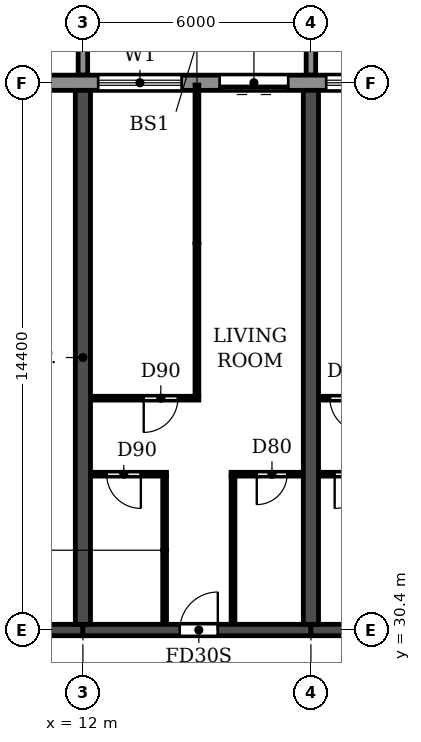
"""IFC4 building model, lengths in metres.
Left out: names, types, materials, properties, quantities, classifications, styles, units other than length and angle.
Written with IfcOpenShell. Run it as: python <this file> out.ifc"""

import sys

from ifc_helpers import new_model, si_unit, direction, frame, frame_2d, origin, place, context, subcontext, project, spatial, polyline, rectangle, outline, extrude, source, transform, mapped, element, fill, save


model = new_model("IFC4")
c1 = context("Model", 3, precision=1e-05, world=origin(), true_north=direction((0.0, 1.0)))
c2 = subcontext(c1, "Body", "Model", "MODEL_VIEW")
j1 = project(units=[si_unit("LENGTHUNIT", "METRE"), si_unit("PLANEANGLEUNIT", "RADIAN")], contexts=[c1])
p1 = place(None, origin())
s1 = spatial("IfcSite", under=j1, at=p1, CompositionType="ELEMENT")
p2 = place(p1, origin())
s2 = spatial("IfcBuilding", under=s1, at=p2, CompositionType="ELEMENT")
p3 = place(p2, frame((0.0, 0.0, 63.0)))
s3 = spatial("IfcBuildingStorey", under=s2, at=p3, CompositionType="ELEMENT", Elevation=63.0)
for number, where, z_axis, x_axis in (
    (1, (12.0, 30.55, 0.0), (0.0, 0.0, 1.0), (0.0, 1.0, 0.0)),
    (2, (18.0, 30.55, 0.0), (0.0, 0.0, 1.0), (0.0, 1.0, 0.0)),
):
    element("IfcWall", number, at=place(p3, frame(where, z_axis=z_axis, x_axis=x_axis)), inside=s3, PredefinedType="SHEAR", context=c2, shape_type="SweptSolid", body=[
        extrude(rectangle(XDim=14.05, YDim=0.4, at=frame_2d((7.025, 0.0))), origin(), (0.0, 0.0, 1.0), 2.95),
    ])
p4 = place(p3, frame((6.2, 30.4, 0.0), z_axis=(0.0, 0.0, 1.0), x_axis=(1.0, 0.0, 0.0)))
e3 = element("IfcWall", 3, at=p4, inside=s3, PredefinedType="SHEAR", context=c2, shape_type="SweptSolid", body=[
    extrude(rectangle(XDim=5.8, YDim=0.3, at=frame_2d((2.9, 0.0))), origin(), (0.0, 0.0, 1.0), 2.35),
])
p5 = place(p4, frame((2.3, 0.0, 0.0)))
e4 = element("IfcOpeningElement", 4, at=p5, cuts=e3, PredefinedType="OPENING", context=c2, shape_type="SweptSolid", body=[
    extrude(rectangle(XDim=1.0, YDim=2.1, at=frame_2d((0.5, 1.05))), frame((0.0, 0.16, 0.0), z_axis=(0.0, -1.0, 0.0), x_axis=(1.0, 0.0, 0.0)), (0.0, 0.0, 1.0), 0.32),
])
p6 = place(p3, frame((12.0, 30.4, 0.0), z_axis=(0.0, 0.0, 1.0), x_axis=(1.0, 0.0, 0.0)))
e5 = element("IfcWall", 5, at=p6, inside=s3, PredefinedType="SHEAR", context=c2, shape_type="SweptSolid", body=[
    extrude(rectangle(XDim=6.0, YDim=0.3, at=frame_2d((3.0, 0.0))), origin(), (0.0, 0.0, 1.0), 2.35),
])
p7 = place(p6, frame((2.55, 0.0, 0.0)))
e6 = element("IfcOpeningElement", 6, at=p7, cuts=e5, PredefinedType="OPENING", context=c2, shape_type="SweptSolid", body=[
    extrude(rectangle(XDim=1.0, YDim=2.1, at=frame_2d((0.5, 1.05))), frame((0.0, 0.16, 0.0), z_axis=(0.0, -1.0, 0.0), x_axis=(1.0, 0.0, 0.0)), (0.0, 0.0, 1.0), 0.32),
])
p8 = place(p3, frame((18.0, 30.4, 0.0), z_axis=(0.0, 0.0, 1.0), x_axis=(1.0, 0.0, 0.0)))
e7 = element("IfcWall", 7, at=p8, inside=s3, PredefinedType="SHEAR", context=c2, shape_type="SweptSolid", body=[
    extrude(rectangle(XDim=6.0, YDim=0.3, at=frame_2d((3.0, 0.0))), origin(), (0.0, 0.0, 1.0), 2.35),
])
p9 = place(p8, frame((2.55, 0.0, 0.0)))
e8 = element("IfcOpeningElement", 8, at=p9, cuts=e7, PredefinedType="OPENING", context=c2, shape_type="SweptSolid", body=[
    extrude(rectangle(XDim=1.0, YDim=2.1, at=frame_2d((0.5, 1.05))), frame((0.0, 0.16, 0.0), z_axis=(0.0, -1.0, 0.0), x_axis=(1.0, 0.0, 0.0)), (0.0, 0.0, 1.0), 0.32),
])
p10 = place(p3, frame((91.317, 44.8, 0.0), z_axis=(0.0, 0.0, 1.0), x_axis=(-1.0, 0.0, 0.0)))
e9 = element("IfcWall", 9, at=p10, inside=s3, PredefinedType="STANDARD", context=c2, shape_type="SweptSolid", body=[
    extrude(rectangle(XDim=80.634, YDim=0.4, at=frame_2d((40.317, 0.0))), origin(), (0.0, 0.0, 1.0), 2.95),
])
p11 = place(p10, frame((76.717, 0.0, 0.9)))
e10 = element("IfcOpeningElement", 10, at=p11, cuts=e9, PredefinedType="OPENING", context=c2, shape_type="SweptSolid", body=[
    extrude(rectangle(XDim=2.2, YDim=1.5, at=frame_2d((1.1, 0.75))), frame((0.0, 0.21, 0.0), z_axis=(0.0, -1.0, 0.0), x_axis=(1.0, 0.0, 0.0)), (0.0, 0.0, 1.0), 0.42),
])
p12 = place(p10, frame((73.917, 0.0, 0.0)))
e11 = element("IfcOpeningElement", 11, at=p12, cuts=e9, PredefinedType="OPENING", context=c2, shape_type="SweptSolid", body=[
    extrude(rectangle(XDim=1.8, YDim=2.4, at=frame_2d((0.9, 1.2))), frame((0.0, 0.21, 0.0), z_axis=(0.0, -1.0, 0.0), x_axis=(1.0, 0.0, 0.0)), (0.0, 0.0, 1.0), 0.42),
])
p13 = place(p10, frame((70.717, 0.0, 0.9)))
e12 = element("IfcOpeningElement", 12, at=p13, cuts=e9, PredefinedType="OPENING", context=c2, shape_type="SweptSolid", body=[
    extrude(rectangle(XDim=2.2, YDim=1.5, at=frame_2d((1.1, 0.75))), frame((0.0, 0.21, 0.0), z_axis=(0.0, -1.0, 0.0), x_axis=(1.0, 0.0, 0.0)), (0.0, 0.0, 1.0), 0.42),
])
p14 = place(p10, frame((67.917, 0.0, 0.0)))
e13 = element("IfcOpeningElement", 13, at=p14, cuts=e9, PredefinedType="OPENING", context=c2, shape_type="SweptSolid", body=[
    extrude(rectangle(XDim=1.8, YDim=2.4, at=frame_2d((0.9, 1.2))), frame((0.0, 0.21, 0.0), z_axis=(0.0, -1.0, 0.0), x_axis=(1.0, 0.0, 0.0)), (0.0, 0.0, 1.0), 0.42),
])
p15 = place(p10, frame((64.717, 0.0, 0.9)))
e14 = element("IfcOpeningElement", 14, at=p15, cuts=e9, PredefinedType="OPENING", context=c2, shape_type="SweptSolid", body=[
    extrude(rectangle(XDim=2.2, YDim=1.5, at=frame_2d((1.1, 0.75))), frame((0.0, 0.21, 0.0), z_axis=(0.0, -1.0, 0.0), x_axis=(1.0, 0.0, 0.0)), (0.0, 0.0, 1.0), 0.42),
])
p16 = place(p10, frame((61.917, 0.0, 0.0)))
e15 = element("IfcOpeningElement", 15, at=p16, cuts=e9, PredefinedType="OPENING", context=c2, shape_type="SweptSolid", body=[
    extrude(rectangle(XDim=1.8, YDim=2.4, at=frame_2d((0.9, 1.2))), frame((0.0, 0.21, 0.0), z_axis=(0.0, -1.0, 0.0), x_axis=(1.0, 0.0, 0.0)), (0.0, 0.0, 1.0), 0.42),
])
p17 = place(p10, frame((58.717, 0.0, 0.9)))
e16 = element("IfcOpeningElement", 16, at=p17, cuts=e9, PredefinedType="OPENING", context=c2, shape_type="SweptSolid", body=[
    extrude(rectangle(XDim=2.2, YDim=1.5, at=frame_2d((1.1, 0.75))), frame((0.0, 0.21, 0.0), z_axis=(0.0, -1.0, 0.0), x_axis=(1.0, 0.0, 0.0)), (0.0, 0.0, 1.0), 0.42),
])
p18 = place(p10, frame((55.717, 0.0, 0.9)))
e17 = element("IfcOpeningElement", 17, at=p18, cuts=e9, PredefinedType="OPENING", context=c2, shape_type="SweptSolid", body=[
    extrude(rectangle(XDim=2.2, YDim=1.5, at=frame_2d((1.1, 0.75))), frame((0.0, 0.21, 0.0), z_axis=(0.0, -1.0, 0.0), x_axis=(1.0, 0.0, 0.0)), (0.0, 0.0, 1.0), 0.42),
])
p19 = place(p10, frame((52.917, 0.0, 0.0)))
e18 = element("IfcOpeningElement", 18, at=p19, cuts=e9, PredefinedType="OPENING", context=c2, shape_type="SweptSolid", body=[
    extrude(rectangle(XDim=1.8, YDim=2.4, at=frame_2d((0.9, 1.2))), frame((0.0, 0.21, 0.0), z_axis=(0.0, -1.0, 0.0), x_axis=(1.0, 0.0, 0.0)), (0.0, 0.0, 1.0), 0.42),
])
p20 = place(p10, frame((49.717, 0.0, 0.9)))
e19 = element("IfcOpeningElement", 19, at=p20, cuts=e9, PredefinedType="OPENING", context=c2, shape_type="SweptSolid", body=[
    extrude(rectangle(XDim=2.2, YDim=1.5, at=frame_2d((1.1, 0.75))), frame((0.0, 0.21, 0.0), z_axis=(0.0, -1.0, 0.0), x_axis=(1.0, 0.0, 0.0)), (0.0, 0.0, 1.0), 0.42),
])
p21 = place(p10, frame((46.917, 0.0, 0.0)))
e20 = element("IfcOpeningElement", 20, at=p21, cuts=e9, PredefinedType="OPENING", context=c2, shape_type="SweptSolid", body=[
    extrude(rectangle(XDim=1.8, YDim=2.4, at=frame_2d((0.9, 1.2))), frame((0.0, 0.21, 0.0), z_axis=(0.0, -1.0, 0.0), x_axis=(1.0, 0.0, 0.0)), (0.0, 0.0, 1.0), 0.42),
])
p22 = place(p10, frame((43.717, 0.0, 0.9)))
e21 = element("IfcOpeningElement", 21, at=p22, cuts=e9, PredefinedType="OPENING", context=c2, shape_type="SweptSolid", body=[
    extrude(rectangle(XDim=2.2, YDim=1.5, at=frame_2d((1.1, 0.75))), frame((0.0, 0.21, 0.0), z_axis=(0.0, -1.0, 0.0), x_axis=(1.0, 0.0, 0.0)), (0.0, 0.0, 1.0), 0.42),
])
p23 = place(p10, frame((40.717, 0.0, 0.9)))
e22 = element("IfcOpeningElement", 22, at=p23, cuts=e9, PredefinedType="OPENING", context=c2, shape_type="SweptSolid", body=[
    extrude(rectangle(XDim=2.2, YDim=1.5, at=frame_2d((1.1, 0.75))), frame((0.0, 0.21, 0.0), z_axis=(0.0, -1.0, 0.0), x_axis=(1.0, 0.0, 0.0)), (0.0, 0.0, 1.0), 0.42),
])
p24 = place(p10, frame((37.717, 0.0, 0.9)))
e23 = element("IfcOpeningElement", 23, at=p24, cuts=e9, PredefinedType="OPENING", context=c2, shape_type="SweptSolid", body=[
    extrude(rectangle(XDim=2.2, YDim=1.5, at=frame_2d((1.1, 0.75))), frame((0.0, 0.21, 0.0), z_axis=(0.0, -1.0, 0.0), x_axis=(1.0, 0.0, 0.0)), (0.0, 0.0, 1.0), 0.42),
])
p25 = place(p10, frame((34.717, 0.0, 0.9)))
e24 = element("IfcOpeningElement", 24, at=p25, cuts=e9, PredefinedType="OPENING", context=c2, shape_type="SweptSolid", body=[
    extrude(rectangle(XDim=2.2, YDim=1.5, at=frame_2d((1.1, 0.75))), frame((0.0, 0.21, 0.0), z_axis=(0.0, -1.0, 0.0), x_axis=(1.0, 0.0, 0.0)), (0.0, 0.0, 1.0), 0.42),
])
p26 = place(p10, frame((31.917, 0.0, 0.0)))
e25 = element("IfcOpeningElement", 25, at=p26, cuts=e9, PredefinedType="OPENING", context=c2, shape_type="SweptSolid", body=[
    extrude(rectangle(XDim=1.8, YDim=2.4, at=frame_2d((0.9, 1.2))), frame((0.0, 0.21, 0.0), z_axis=(0.0, -1.0, 0.0), x_axis=(1.0, 0.0, 0.0)), (0.0, 0.0, 1.0), 0.42),
])
p27 = place(p10, frame((28.917, 0.0, 0.0)))
e26 = element("IfcOpeningElement", 26, at=p27, cuts=e9, PredefinedType="OPENING", context=c2, shape_type="SweptSolid", body=[
    extrude(rectangle(XDim=1.8, YDim=2.4, at=frame_2d((0.9, 1.2))), frame((0.0, 0.21, 0.0), z_axis=(0.0, -1.0, 0.0), x_axis=(1.0, 0.0, 0.0)), (0.0, 0.0, 1.0), 0.42),
])
p28 = place(p10, frame((25.717, 0.0, 0.9)))
e27 = element("IfcOpeningElement", 27, at=p28, cuts=e9, PredefinedType="OPENING", context=c2, shape_type="SweptSolid", body=[
    extrude(rectangle(XDim=2.2, YDim=1.5, at=frame_2d((1.1, 0.75))), frame((0.0, 0.21, 0.0), z_axis=(0.0, -1.0, 0.0), x_axis=(1.0, 0.0, 0.0)), (0.0, 0.0, 1.0), 0.42),
])
p29 = place(p10, frame((22.917, 0.0, 0.0)))
e28 = element("IfcOpeningElement", 28, at=p29, cuts=e9, PredefinedType="OPENING", context=c2, shape_type="SweptSolid", body=[
    extrude(rectangle(XDim=1.8, YDim=2.4, at=frame_2d((0.9, 1.2))), frame((0.0, 0.21, 0.0), z_axis=(0.0, -1.0, 0.0), x_axis=(1.0, 0.0, 0.0)), (0.0, 0.0, 1.0), 0.42),
])
p30 = place(p10, frame((19.717, 0.0, 0.9)))
e29 = element("IfcOpeningElement", 29, at=p30, cuts=e9, PredefinedType="OPENING", context=c2, shape_type="SweptSolid", body=[
    extrude(rectangle(XDim=2.2, YDim=1.5, at=frame_2d((1.1, 0.75))), frame((0.0, 0.21, 0.0), z_axis=(0.0, -1.0, 0.0), x_axis=(1.0, 0.0, 0.0)), (0.0, 0.0, 1.0), 0.42),
])
p31 = place(p10, frame((16.917, 0.0, 0.0)))
e30 = element("IfcOpeningElement", 30, at=p31, cuts=e9, PredefinedType="OPENING", context=c2, shape_type="SweptSolid", body=[
    extrude(rectangle(XDim=1.8, YDim=2.4, at=frame_2d((0.9, 1.2))), frame((0.0, 0.21, 0.0), z_axis=(0.0, -1.0, 0.0), x_axis=(1.0, 0.0, 0.0)), (0.0, 0.0, 1.0), 0.42),
])
p32 = place(p10, frame((13.717, 0.0, 0.9)))
e31 = element("IfcOpeningElement", 31, at=p32, cuts=e9, PredefinedType="OPENING", context=c2, shape_type="SweptSolid", body=[
    extrude(rectangle(XDim=2.2, YDim=1.5, at=frame_2d((1.1, 0.75))), frame((0.0, 0.21, 0.0), z_axis=(0.0, -1.0, 0.0), x_axis=(1.0, 0.0, 0.0)), (0.0, 0.0, 1.0), 0.42),
])
p33 = place(p10, frame((10.917, 0.0, 0.0)))
e32 = element("IfcOpeningElement", 32, at=p33, cuts=e9, PredefinedType="OPENING", context=c2, shape_type="SweptSolid", body=[
    extrude(rectangle(XDim=1.8, YDim=2.4, at=frame_2d((0.9, 1.2))), frame((0.0, 0.21, 0.0), z_axis=(0.0, -1.0, 0.0), x_axis=(1.0, 0.0, 0.0)), (0.0, 0.0, 1.0), 0.42),
])
p34 = place(p10, frame((7.717, 0.0, 0.9)))
e33 = element("IfcOpeningElement", 33, at=p34, cuts=e9, PredefinedType="OPENING", context=c2, shape_type="SweptSolid", body=[
    extrude(rectangle(XDim=2.2, YDim=1.5, at=frame_2d((1.1, 0.75))), frame((0.0, 0.21, 0.0), z_axis=(0.0, -1.0, 0.0), x_axis=(1.0, 0.0, 0.0)), (0.0, 0.0, 1.0), 0.42),
])
p35 = place(p10, frame((4.717, 0.0, 0.9)))
e34 = element("IfcOpeningElement", 34, at=p35, cuts=e9, PredefinedType="OPENING", context=c2, shape_type="SweptSolid", body=[
    extrude(rectangle(XDim=2.2, YDim=1.5, at=frame_2d((1.1, 0.75))), frame((0.0, 0.21, 0.0), z_axis=(0.0, -1.0, 0.0), x_axis=(1.0, 0.0, 0.0)), (0.0, 0.0, 1.0), 0.42),
])
p36 = place(p10, frame((1.717, 0.0, 0.9)))
e35 = element("IfcOpeningElement", 35, at=p36, cuts=e9, PredefinedType="OPENING", context=c2, shape_type="SweptSolid", body=[
    extrude(rectangle(XDim=2.2, YDim=1.5, at=frame_2d((1.1, 0.75))), frame((0.0, 0.21, 0.0), z_axis=(0.0, -1.0, 0.0), x_axis=(1.0, 0.0, 0.0)), (0.0, 0.0, 1.0), 0.42),
])
m1 = source(origin(), c2, "Body", "SweptSolid", [
    extrude(outline(polyline([(0.0, 0.0), (0.25, 0.0), (0.25, 3.1), (0.0, 3.1), (0.0, 0.0)])), origin(), (0.0, 0.0, 1.0), 3.1),
])
for number, where in (
    (36, (11.875, 45.0, 0.0)),
    (37, (17.875, 45.0, 0.0)),
):
    element("IfcWall", number, at=place(p3, frame(where)), inside=s3, PredefinedType="STANDARD", context=c2, shape_type="MappedRepresentation", body=[
        mapped(m1, transform((0.0, 0.0, 0.0))),
    ])
p37 = place(p3, frame((12.21, 34.5, 0.0), z_axis=(0.0, 0.0, 1.0), x_axis=(1.0, 0.0, 0.0)))
e38 = element("IfcWall", 38, at=p37, inside=s3, PredefinedType="PARTITIONING", context=c2, shape_type="SweptSolid", body=[
    extrude(rectangle(XDim=1.99, YDim=0.1, at=frame_2d((0.995, 0.0))), origin(), (0.0, 0.0, 1.0), 2.95),
])
p38 = place(p37, frame((0.415, 0.0, 0.0)))
e39 = element("IfcOpeningElement", 39, at=p38, cuts=e38, PredefinedType="OPENING", context=c2, shape_type="SweptSolid", body=[
    extrude(rectangle(XDim=0.9, YDim=2.1, at=frame_2d((0.45, 1.05))), frame((0.0, 0.06, 0.0), z_axis=(0.0, -1.0, 0.0), x_axis=(1.0, 0.0, 0.0)), (0.0, 0.0, 1.0), 0.12),
])
p39 = place(p3, frame((15.9, 34.5, 0.0), z_axis=(0.0, 0.0, 1.0), x_axis=(1.0, 0.0, 0.0)))
e40 = element("IfcWall", 40, at=p39, inside=s3, PredefinedType="PARTITIONING", context=c2, shape_type="SweptSolid", body=[
    extrude(rectangle(XDim=1.89, YDim=0.1, at=frame_2d((0.945, 0.0))), origin(), (0.0, 0.0, 1.0), 2.95),
])
p40 = place(p39, frame((0.675, 0.0, 0.0)))
e41 = element("IfcOpeningElement", 41, at=p40, cuts=e40, PredefinedType="OPENING", context=c2, shape_type="SweptSolid", body=[
    extrude(rectangle(XDim=0.8, YDim=2.1, at=frame_2d((0.4, 1.05))), frame((0.0, 0.06, 0.0), z_axis=(0.0, -1.0, 0.0), x_axis=(1.0, 0.0, 0.0)), (0.0, 0.0, 1.0), 0.12),
])
p41 = place(p3, frame((18.21, 34.5, 0.0), z_axis=(0.0, 0.0, 1.0), x_axis=(1.0, 0.0, 0.0)))
e42 = element("IfcWall", 42, at=p41, inside=s3, PredefinedType="PARTITIONING", context=c2, shape_type="SweptSolid", body=[
    extrude(rectangle(XDim=1.99, YDim=0.1, at=frame_2d((0.995, 0.0))), origin(), (0.0, 0.0, 1.0), 2.95),
])
p42 = place(p41, frame((0.415, 0.0, 0.0)))
e43 = element("IfcOpeningElement", 43, at=p42, cuts=e42, PredefinedType="OPENING", context=c2, shape_type="SweptSolid", body=[
    extrude(rectangle(XDim=0.9, YDim=2.1, at=frame_2d((0.45, 1.05))), frame((0.0, 0.06, 0.0), z_axis=(0.0, -1.0, 0.0), x_axis=(1.0, 0.0, 0.0)), (0.0, 0.0, 1.0), 0.12),
])
p43 = place(p3, frame((12.21, 36.5, 0.0), z_axis=(0.0, 0.0, 1.0), x_axis=(1.0, 0.0, 0.0)))
e44 = element("IfcWall", 44, at=p43, inside=s3, PredefinedType="PARTITIONING", context=c2, shape_type="SweptSolid", body=[
    extrude(rectangle(XDim=2.84, YDim=0.1, at=frame_2d((1.42, 0.0))), origin(), (0.0, 0.0, 1.0), 2.95),
])
p44 = place(p43, frame((1.39, 0.0, 0.0)))
e45 = element("IfcOpeningElement", 45, at=p44, cuts=e44, PredefinedType="OPENING", context=c2, shape_type="SweptSolid", body=[
    extrude(rectangle(XDim=0.9, YDim=2.1, at=frame_2d((0.45, 1.05))), frame((0.0, 0.06, 0.0), z_axis=(0.0, -1.0, 0.0), x_axis=(1.0, 0.0, 0.0)), (0.0, 0.0, 1.0), 0.12),
])
p45 = place(p3, frame((18.21, 36.5, 0.0), z_axis=(0.0, 0.0, 1.0), x_axis=(1.0, 0.0, 0.0)))
e46 = element("IfcWall", 46, at=p45, inside=s3, PredefinedType="PARTITIONING", context=c2, shape_type="SweptSolid", body=[
    extrude(rectangle(XDim=2.84, YDim=0.1, at=frame_2d((1.42, 0.0))), origin(), (0.0, 0.0, 1.0), 2.95),
])
p46 = place(p45, frame((0.29, 0.0, 0.0)))
e47 = element("IfcOpeningElement", 47, at=p46, cuts=e46, PredefinedType="OPENING", context=c2, shape_type="SweptSolid", body=[
    extrude(rectangle(XDim=0.9, YDim=2.1, at=frame_2d((0.45, 1.05))), frame((0.0, 0.06, 0.0), z_axis=(0.0, -1.0, 0.0), x_axis=(1.0, 0.0, 0.0)), (0.0, 0.0, 1.0), 0.12),
])
p47 = place(p3, frame((14.15, 30.56, 0.0), z_axis=(0.0, 0.0, 1.0), x_axis=(0.0, 1.0, 0.0)))
e48 = element("IfcWall", 48, at=p47, inside=s3, PredefinedType="PARTITIONING", context=c2, shape_type="SweptSolid", body=[
    extrude(rectangle(XDim=3.89, YDim=0.1, at=frame_2d((1.945, 0.0))), origin(), (0.0, 0.0, 1.0), 2.95),
])
p48 = place(p3, frame((15.0, 36.55, 0.0), z_axis=(0.0, 0.0, 1.0), x_axis=(0.0, 1.0, 0.0)))
e49 = element("IfcWall", 49, at=p48, inside=s3, PredefinedType="PARTITIONING", context=c2, shape_type="SweptSolid", body=[
    extrude(rectangle(XDim=8.19, YDim=0.1, at=frame_2d((4.095, 0.0))), origin(), (0.0, 0.0, 1.0), 2.95),
])
p49 = place(p3, frame((15.95, 30.56, 0.0), z_axis=(0.0, 0.0, 1.0), x_axis=(0.0, 1.0, 0.0)))
e50 = element("IfcWall", 50, at=p49, inside=s3, PredefinedType="PARTITIONING", context=c2, shape_type="SweptSolid", body=[
    extrude(rectangle(XDim=3.89, YDim=0.1, at=frame_2d((1.945, 0.0))), origin(), (0.0, 0.0, 1.0), 2.95),
])
p50 = place(p11, origin())
e51 = element("IfcWindow", 51, at=p50, inside=s3, PartitioningType="DOUBLE_PANEL_HORIZONTAL", PredefinedType="WINDOW", context=c2, shape_type="SweptSolid", body=[
    extrude(rectangle(XDim=2.2, YDim=1.5, at=frame_2d((1.1, 0.75))), frame((0.0, 0.03, 0.0), z_axis=(0.0, -1.0, 0.0), x_axis=(1.0, 0.0, 0.0)), (0.0, 0.0, 1.0), 0.06),
])
fill(e10, e51)
p51 = place(p12, origin())
e52 = element("IfcDoor", 52, at=p51, inside=s3, OperationType="DOUBLE_DOOR_SLIDING", PredefinedType="DOOR", context=c2, shape_type="SweptSolid", body=[
    extrude(rectangle(XDim=1.8, YDim=2.4, at=frame_2d((0.9, 1.2))), frame((0.0, 0.025, 0.0), z_axis=(0.0, -1.0, 0.0), x_axis=(1.0, 0.0, 0.0)), (0.0, 0.0, 1.0), 0.05),
])
fill(e11, e52)
p52 = place(p13, origin())
e53 = element("IfcWindow", 53, at=p52, inside=s3, PartitioningType="DOUBLE_PANEL_HORIZONTAL", PredefinedType="WINDOW", context=c2, shape_type="SweptSolid", body=[
    extrude(rectangle(XDim=2.2, YDim=1.5, at=frame_2d((1.1, 0.75))), frame((0.0, 0.03, 0.0), z_axis=(0.0, -1.0, 0.0), x_axis=(1.0, 0.0, 0.0)), (0.0, 0.0, 1.0), 0.06),
])
fill(e12, e53)
p53 = place(p38, frame((0.9, 0.0, 0.0), z_axis=(0.0, 0.0, 1.0), x_axis=(-1.0, 0.0, 0.0)))
e54 = element("IfcDoor", 54, at=p53, inside=s3, OperationType="SINGLE_SWING_LEFT", PredefinedType="DOOR", context=c2, shape_type="SweptSolid", body=[
    extrude(rectangle(XDim=0.9, YDim=2.1, at=frame_2d((0.45, 1.05))), frame((0.0, 0.025, 0.0), z_axis=(0.0, -1.0, 0.0), x_axis=(1.0, 0.0, 0.0)), (0.0, 0.0, 1.0), 0.05),
])
fill(e39, e54)
p54 = place(p44, frame((0.9, 0.0, 0.0), z_axis=(0.0, 0.0, 1.0), x_axis=(-1.0, 0.0, 0.0)))
e55 = element("IfcDoor", 55, at=p54, inside=s3, OperationType="SINGLE_SWING_RIGHT", PredefinedType="DOOR", context=c2, shape_type="SweptSolid", body=[
    extrude(rectangle(XDim=0.9, YDim=2.1, at=frame_2d((0.45, 1.05))), frame((0.0, 0.025, 0.0), z_axis=(0.0, -1.0, 0.0), x_axis=(1.0, 0.0, 0.0)), (0.0, 0.0, 1.0), 0.05),
])
fill(e45, e55)
p55 = place(p7, origin())
e56 = element("IfcDoor", 56, at=p55, inside=s3, OperationType="SINGLE_SWING_RIGHT", PredefinedType="DOOR", context=c2, shape_type="SweptSolid", body=[
    extrude(rectangle(XDim=1.0, YDim=2.1, at=frame_2d((0.5, 1.05))), frame((0.0, 0.025, 0.0), z_axis=(0.0, -1.0, 0.0), x_axis=(1.0, 0.0, 0.0)), (0.0, 0.0, 1.0), 0.05),
])
fill(e6, e56)
p56 = place(p40, frame((0.8, 0.0, 0.0), z_axis=(0.0, 0.0, 1.0), x_axis=(-1.0, 0.0, 0.0)))
e57 = element("IfcDoor", 57, at=p56, inside=s3, OperationType="SINGLE_SWING_RIGHT", PredefinedType="DOOR", context=c2, shape_type="SweptSolid", body=[
    extrude(rectangle(XDim=0.8, YDim=2.1, at=frame_2d((0.4, 1.05))), frame((0.0, 0.025, 0.0), z_axis=(0.0, -1.0, 0.0), x_axis=(1.0, 0.0, 0.0)), (0.0, 0.0, 1.0), 0.05),
])
fill(e41, e57)
p57 = place(p46, frame((0.9, 0.0, 0.0), z_axis=(0.0, 0.0, 1.0), x_axis=(-1.0, 0.0, 0.0)))
e58 = element("IfcDoor", 58, at=p57, inside=s3, OperationType="SINGLE_SWING_LEFT", PredefinedType="DOOR", context=c2, shape_type="SweptSolid", body=[
    extrude(rectangle(XDim=0.9, YDim=2.1, at=frame_2d((0.45, 1.05))), frame((0.0, 0.025, 0.0), z_axis=(0.0, -1.0, 0.0), x_axis=(1.0, 0.0, 0.0)), (0.0, 0.0, 1.0), 0.05),
])
fill(e47, e58)
p58 = place(p42, frame((0.9, 0.0, 0.0), z_axis=(0.0, 0.0, 1.0), x_axis=(-1.0, 0.0, 0.0)))
e59 = element("IfcDoor", 59, at=p58, inside=s3, OperationType="SINGLE_SWING_RIGHT", PredefinedType="DOOR", context=c2, shape_type="SweptSolid", body=[
    extrude(rectangle(XDim=0.9, YDim=2.1, at=frame_2d((0.45, 1.05))), frame((0.0, 0.025, 0.0), z_axis=(0.0, -1.0, 0.0), x_axis=(1.0, 0.0, 0.0)), (0.0, 0.0, 1.0), 0.05),
])
fill(e43, e59)
save(model, sys.argv[1])
